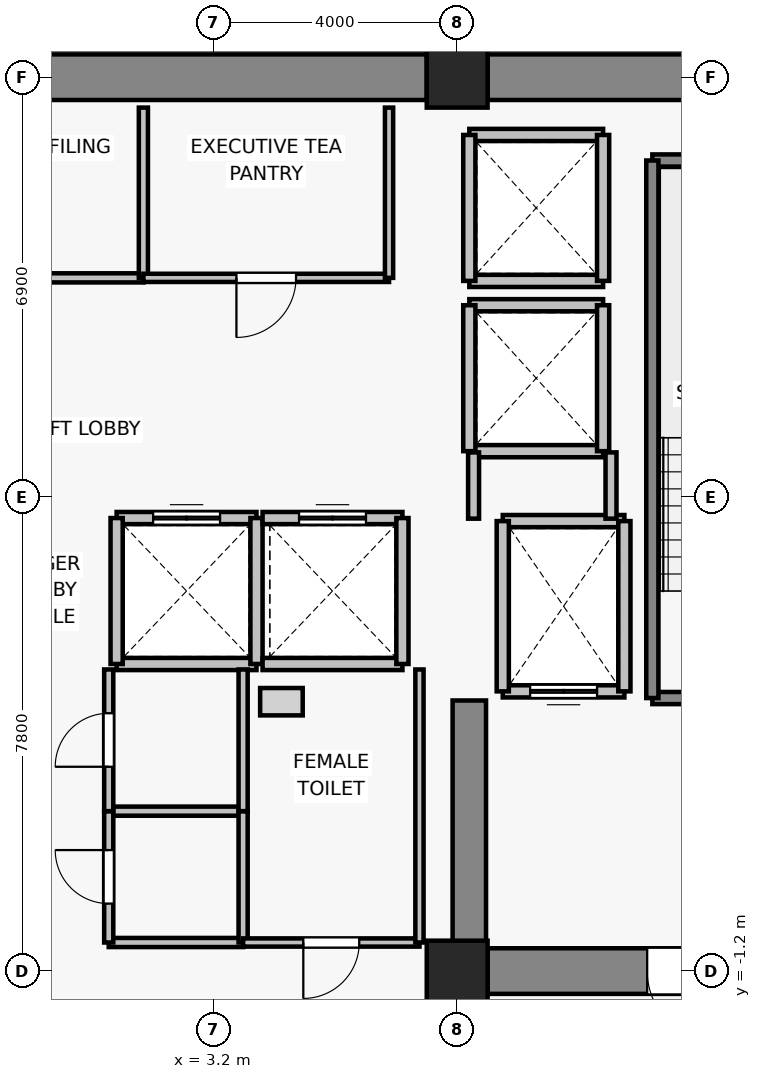
"""IFC4 building model, lengths in metres.
Left out: names, types, materials, properties, quantities, classifications, styles, units other than length and angle.
Written with IfcOpenShell. Run it as: python <this file> out.ifc"""

import sys

from ifc_helpers import new_model, si_unit, direction, frame, frame_2d, origin, origin_2d, place, context, subcontext, project, spatial, rectangle, extrude, source, transform, mapped, element, fill, save


model = new_model("IFC4")
c1 = context("Model", 3, precision=1e-05, world=origin(), true_north=direction((0.0, 1.0)))
c2 = subcontext(c1, "Body", "Model", "MODEL_VIEW")
j1 = project(units=[si_unit("LENGTHUNIT", "METRE"), si_unit("PLANEANGLEUNIT", "RADIAN")], contexts=[c1])
p1 = place(None, origin())
s1 = spatial("IfcSite", under=j1, at=p1, CompositionType="ELEMENT")
p2 = place(p1, origin())
s2 = spatial("IfcBuilding", under=s1, at=p2, CompositionType="ELEMENT")
p3 = place(p2, frame((0.0, 0.0, 192.4)))
s3 = spatial("IfcBuildingStorey", under=s2, at=p3, CompositionType="ELEMENT", Elevation=192.4)
for number, where, z_axis, x_axis in (
    (1, (7.2, -1.2, 0.0), (0.0, 0.0, 1.0), (1.0, 0.0, 0.0)),
    (2, (7.2, 13.5, 0.0), (0.0, 0.0, 1.0), (1.0, 0.0, 0.0)),
):
    element("IfcColumn", number, at=place(p3, frame(where, z_axis=z_axis, x_axis=x_axis)), inside=s3, PredefinedType="COLUMN", context=c2, shape_type="SweptSolid", body=[
        extrude(rectangle(XDim=1.0, YDim=1.0, at=origin_2d()), origin(), (0.0, 0.0, 1.0), 3.3),
    ])
p4 = place(p3, frame((-6.7, 13.5, 0.0), z_axis=(0.0, 0.0, 1.0), x_axis=(1.0, 0.0, 0.0)))
e3 = element("IfcWall", 3, at=p4, inside=s3, PredefinedType="SHEAR", context=c2, shape_type="SweptSolid", body=[
    extrude(rectangle(XDim=13.4, YDim=0.75, at=frame_2d((6.7, 0.0))), origin(), (0.0, 0.0, 1.0), 3.075),
])
p5 = place(p3, frame((7.7, 13.5, 0.0), z_axis=(0.0, 0.0, 1.0), x_axis=(1.0, 0.0, 0.0)))
e4 = element("IfcWall", 4, at=p5, inside=s3, PredefinedType="SHEAR", context=c2, shape_type="SweptSolid", body=[
    extrude(rectangle(XDim=6.2, YDim=0.75, at=frame_2d((3.1, 0.0))), origin(), (0.0, 0.0, 1.0), 3.075),
])
p6 = place(p3, frame((13.9, -1.2, 0.0), z_axis=(0.0, 0.0, 1.0), x_axis=(-1.0, 0.0, 0.0)))
e5 = element("IfcWall", 5, at=p6, inside=s3, PredefinedType="SHEAR", context=c2, shape_type="SweptSolid", body=[
    extrude(rectangle(XDim=6.2, YDim=0.75, at=frame_2d((3.1, 0.0))), origin(), (0.0, 0.0, 1.0), 3.075),
])
p7 = place(p6, frame((2.425, 0.0, 0.0)))
e6 = element("IfcOpeningElement", 6, at=p7, cuts=e5, PredefinedType="OPENING", context=c2, shape_type="SweptSolid", body=[
    extrude(rectangle(XDim=1.15, YDim=2.15, at=frame_2d((0.575, 1.075))), frame((0.0, 0.385, 0.0), z_axis=(0.0, -1.0, 0.0), x_axis=(1.0, 0.0, 0.0)), (0.0, 0.0, 1.0), 0.77),
])
p8 = place(p3, frame((7.4, -0.825, 0.0), z_axis=(0.0, 0.0, 1.0), x_axis=(0.0, 1.0, 0.0)))
e7 = element("IfcWall", 7, at=p8, inside=s3, PredefinedType="SHEAR", context=c2, shape_type="SweptSolid", body=[
    extrude(rectangle(XDim=4.075, YDim=0.55, at=frame_2d((2.038, 0.0))), origin(), (0.0, 0.0, 1.0), 3.075),
])
p9 = place(p3, frame((9.95, 3.4, 0.0), z_axis=(0.0, 0.0, 1.0), x_axis=(-1.0, 0.0, 0.0)))
e8 = element("IfcWall", 8, at=p9, inside=s3, PredefinedType="SOLIDWALL", context=c2, shape_type="SweptSolid", body=[
    extrude(rectangle(XDim=2.0, YDim=0.2, at=frame_2d((1.0, 0.0))), origin(), (0.0, 0.0, 1.0), 3.075),
])
p10 = place(p9, frame((0.45, 0.0, 0.0)))
e9 = element("IfcOpeningElement", 9, at=p10, cuts=e8, PredefinedType="OPENING", context=c2, shape_type="SweptSolid", body=[
    extrude(rectangle(XDim=1.1, YDim=2.2, at=frame_2d((0.55, 1.1))), frame((0.0, 0.11, 0.0), z_axis=(0.0, -1.0, 0.0), x_axis=(1.0, 0.0, 0.0)), (0.0, 0.0, 1.0), 0.22),
])
p11 = place(p3, frame((7.95, 6.2, 0.0), z_axis=(0.0, 0.0, 1.0), x_axis=(1.0, 0.0, 0.0)))
e10 = element("IfcWall", 10, at=p11, inside=s3, PredefinedType="SOLIDWALL", context=c2, shape_type="SweptSolid", body=[
    extrude(rectangle(XDim=2.0, YDim=0.2, at=frame_2d((1.0, 0.0))), origin(), (0.0, 0.0, 1.0), 3.075),
])
for number, where, z_axis, x_axis in (
    (11, (7.95, 3.4, 0.0), (0.0, 0.0, 1.0), (0.0, 1.0, 0.0)),
    (12, (9.95, 6.2, 0.0), (0.0, 0.0, 1.0), (0.0, -1.0, 0.0)),
):
    element("IfcWall", number, at=place(p3, frame(where, z_axis=z_axis, x_axis=x_axis)), inside=s3, PredefinedType="SOLIDWALL", context=c2, shape_type="SweptSolid", body=[
        extrude(rectangle(XDim=2.8, YDim=0.2, at=frame_2d((1.4, 0.0))), origin(), (0.0, 0.0, 1.0), 3.075),
    ])
p12 = place(p3, frame((3.9, 3.85, 0.0), z_axis=(0.0, 0.0, 1.0), x_axis=(-1.0, 0.0, 0.0)))
e13 = element("IfcWall", 13, at=p12, inside=s3, PredefinedType="SOLIDWALL", context=c2, shape_type="SweptSolid", body=[
    extrude(rectangle(XDim=2.3, YDim=0.2, at=frame_2d((1.15, 0.0))), origin(), (0.0, 0.0, 1.0), 3.075),
])
p13 = place(p3, frame((1.6, 6.25, 0.0), z_axis=(0.0, 0.0, 1.0), x_axis=(1.0, 0.0, 0.0)))
e14 = element("IfcWall", 14, at=p13, inside=s3, PredefinedType="SOLIDWALL", context=c2, shape_type="SweptSolid", body=[
    extrude(rectangle(XDim=2.3, YDim=0.2, at=frame_2d((1.15, 0.0))), origin(), (0.0, 0.0, 1.0), 3.075),
])
p14 = place(p13, frame((0.6, 0.0, 0.0)))
e15 = element("IfcOpeningElement", 15, at=p14, cuts=e14, PredefinedType="OPENING", context=c2, shape_type="SweptSolid", body=[
    extrude(rectangle(XDim=1.1, YDim=2.2, at=frame_2d((0.55, 1.1))), frame((0.0, 0.11, 0.0), z_axis=(0.0, -1.0, 0.0), x_axis=(1.0, 0.0, 0.0)), (0.0, 0.0, 1.0), 0.22),
])
for number, where, z_axis, x_axis in (
    (16, (1.6, 3.85, 0.0), (0.0, 0.0, 1.0), (0.0, 1.0, 0.0)),
    (17, (3.9, 6.25, 0.0), (0.0, 0.0, 1.0), (0.0, -1.0, 0.0)),
):
    element("IfcWall", number, at=place(p3, frame(where, z_axis=z_axis, x_axis=x_axis)), inside=s3, PredefinedType="SOLIDWALL", context=c2, shape_type="SweptSolid", body=[
        extrude(rectangle(XDim=2.4, YDim=0.2, at=frame_2d((1.2, 0.0))), origin(), (0.0, 0.0, 1.0), 3.075),
    ])
p15 = place(p3, frame((6.3, 3.85, 0.0), z_axis=(0.0, 0.0, 1.0), x_axis=(-1.0, 0.0, 0.0)))
e18 = element("IfcWall", 18, at=p15, inside=s3, PredefinedType="SOLIDWALL", context=c2, shape_type="SweptSolid", body=[
    extrude(rectangle(XDim=2.3, YDim=0.2, at=frame_2d((1.15, 0.0))), origin(), (0.0, 0.0, 1.0), 3.075),
])
p16 = place(p3, frame((4.0, 6.25, 0.0), z_axis=(0.0, 0.0, 1.0), x_axis=(1.0, 0.0, 0.0)))
e19 = element("IfcWall", 19, at=p16, inside=s3, PredefinedType="SOLIDWALL", context=c2, shape_type="SweptSolid", body=[
    extrude(rectangle(XDim=2.3, YDim=0.2, at=frame_2d((1.15, 0.0))), origin(), (0.0, 0.0, 1.0), 3.075),
])
p17 = place(p16, frame((0.6, 0.0, 0.0)))
e20 = element("IfcOpeningElement", 20, at=p17, cuts=e19, PredefinedType="OPENING", context=c2, shape_type="SweptSolid", body=[
    extrude(rectangle(XDim=1.1, YDim=2.2, at=frame_2d((0.55, 1.1))), frame((0.0, 0.11, 0.0), z_axis=(0.0, -1.0, 0.0), x_axis=(1.0, 0.0, 0.0)), (0.0, 0.0, 1.0), 0.22),
])
p18 = place(p3, frame((6.3, 6.25, 0.0), z_axis=(0.0, 0.0, 1.0), x_axis=(0.0, -1.0, 0.0)))
e21 = element("IfcWall", 21, at=p18, inside=s3, PredefinedType="SOLIDWALL", context=c2, shape_type="SweptSolid", body=[
    extrude(rectangle(XDim=2.4, YDim=0.2, at=frame_2d((1.2, 0.0))), origin(), (0.0, 0.0, 1.0), 3.075),
])
for number, where, z_axis, x_axis in (
    (22, (9.6, 7.35, 0.0), (0.0, 0.0, 1.0), (-1.0, 0.0, 0.0)),
    (23, (7.4, 9.75, 0.0), (0.0, 0.0, 1.0), (1.0, 0.0, 0.0)),
):
    element("IfcWall", number, at=place(p3, frame(where, z_axis=z_axis, x_axis=x_axis)), inside=s3, PredefinedType="SOLIDWALL", context=c2, shape_type="SweptSolid", body=[
        extrude(rectangle(XDim=2.2, YDim=0.2, at=frame_2d((1.1, 0.0))), origin(), (0.0, 0.0, 1.0), 2.565),
    ])
p19 = place(p3, frame((7.4, 7.35, 0.0), z_axis=(0.0, 0.0, 1.0), x_axis=(0.0, 1.0, 0.0)))
e24 = element("IfcWall", 24, at=p19, inside=s3, PredefinedType="SOLIDWALL", context=c2, shape_type="SweptSolid", body=[
    extrude(rectangle(XDim=2.4, YDim=0.2, at=frame_2d((1.2, 0.0))), origin(), (0.0, 0.0, 1.0), 2.565),
])
p20 = place(p3, frame((9.6, 9.75, 0.0), z_axis=(0.0, 0.0, 1.0), x_axis=(0.0, -1.0, 0.0)))
e25 = element("IfcWall", 25, at=p20, inside=s3, PredefinedType="SOLIDWALL", context=c2, shape_type="SweptSolid", body=[
    extrude(rectangle(XDim=2.4, YDim=0.2, at=frame_2d((1.2, 0.0))), origin(), (0.0, 0.0, 1.0), 3.075),
])
for number, where, z_axis, x_axis in (
    (26, (9.6, 10.15, 0.0), (0.0, 0.0, 1.0), (-1.0, 0.0, 0.0)),
    (27, (7.4, 12.55, 0.0), (0.0, 0.0, 1.0), (1.0, 0.0, 0.0)),
):
    element("IfcWall", number, at=place(p3, frame(where, z_axis=z_axis, x_axis=x_axis)), inside=s3, PredefinedType="SOLIDWALL", context=c2, shape_type="SweptSolid", body=[
        extrude(rectangle(XDim=2.2, YDim=0.2, at=frame_2d((1.1, 0.0))), origin(), (0.0, 0.0, 1.0), 2.565),
    ])
p21 = place(p3, frame((7.4, 10.15, 0.0), z_axis=(0.0, 0.0, 1.0), x_axis=(0.0, 1.0, 0.0)))
e28 = element("IfcWall", 28, at=p21, inside=s3, PredefinedType="SOLIDWALL", context=c2, shape_type="SweptSolid", body=[
    extrude(rectangle(XDim=2.4, YDim=0.2, at=frame_2d((1.2, 0.0))), origin(), (0.0, 0.0, 1.0), 2.565),
])
p22 = place(p3, frame((9.6, 12.55, 0.0), z_axis=(0.0, 0.0, 1.0), x_axis=(0.0, -1.0, 0.0)))
e29 = element("IfcWall", 29, at=p22, inside=s3, PredefinedType="SOLIDWALL", context=c2, shape_type="SweptSolid", body=[
    extrude(rectangle(XDim=2.4, YDim=0.2, at=frame_2d((1.2, 0.0))), origin(), (0.0, 0.0, 1.0), 3.075),
])
p23 = place(p3, frame((13.93, 3.29, 0.0), z_axis=(0.0, 0.0, 1.0), x_axis=(-1.0, 0.0, 0.0)))
e30 = element("IfcWall", 30, at=p23, inside=s3, PredefinedType="SOLIDWALL", context=c2, shape_type="SweptSolid", body=[
    extrude(rectangle(XDim=3.52, YDim=0.2, at=frame_2d((1.76, 0.0))), origin(), (0.0, 0.0, 1.0), 3.075),
])
p24 = place(p23, frame((1.205, 0.0, 0.0)))
e31 = element("IfcOpeningElement", 31, at=p24, cuts=e30, PredefinedType="OPENING", context=c2, shape_type="SweptSolid", body=[
    extrude(rectangle(XDim=1.15, YDim=2.15, at=frame_2d((0.575, 1.075))), frame((0.0, 0.11, 0.0), z_axis=(0.0, -1.0, 0.0), x_axis=(1.0, 0.0, 0.0)), (0.0, 0.0, 1.0), 0.22),
])
p25 = place(p3, frame((10.41, 12.13, 0.0), z_axis=(0.0, 0.0, 1.0), x_axis=(1.0, 0.0, 0.0)))
e32 = element("IfcWall", 32, at=p25, inside=s3, PredefinedType="SOLIDWALL", context=c2, shape_type="SweptSolid", body=[
    extrude(rectangle(XDim=3.52, YDim=0.2, at=frame_2d((1.76, 0.0))), origin(), (0.0, 0.0, 1.0), 3.075),
])
p26 = place(p3, frame((10.41, 3.29, 0.0), z_axis=(0.0, 0.0, 1.0), x_axis=(0.0, 1.0, 0.0)))
e33 = element("IfcWall", 33, at=p26, inside=s3, PredefinedType="SOLIDWALL", context=c2, shape_type="SweptSolid", body=[
    extrude(rectangle(XDim=8.84, YDim=0.2, at=frame_2d((4.42, 0.0))), origin(), (0.0, 0.0, 1.0), 3.075),
])
p27 = place(p3, frame((7.47, 6.24, 0.0), z_axis=(0.0, 0.0, 1.0), x_axis=(0.0, 1.0, 0.0)))
e34 = element("IfcWall", 34, at=p27, inside=s3, PredefinedType="PARTITIONING", context=c2, shape_type="SweptSolid", body=[
    extrude(rectangle(XDim=1.09, YDim=0.18, at=frame_2d((0.545, 0.0))), origin(), (0.0, 0.0, 1.0), 2.565),
])
p28 = place(p3, frame((9.73, 7.33, 0.0), z_axis=(0.0, 0.0, 1.0), x_axis=(0.0, -1.0, 0.0)))
e35 = element("IfcWall", 35, at=p28, inside=s3, PredefinedType="PARTITIONING", context=c2, shape_type="SweptSolid", body=[
    extrude(rectangle(XDim=1.09, YDim=0.18, at=frame_2d((0.545, 0.0))), origin(), (0.0, 0.0, 1.0), 3.075),
])
p29 = place(p3, frame((2.04, 10.2, 0.0), z_axis=(0.0, 0.0, 1.0), x_axis=(-1.0, 0.0, 0.0)))
e36 = element("IfcWall", 36, at=p29, inside=s3, PredefinedType="PARTITIONING", context=c2, shape_type="SweptSolid", body=[
    extrude(rectangle(XDim=4.16, YDim=0.15, at=frame_2d((2.08, 0.0))), origin(), (0.0, 0.0, 1.0), 3.075),
])
p30 = place(p29, frame((1.55, 0.0, 0.0)))
e37 = element("IfcOpeningElement", 37, at=p30, cuts=e36, PredefinedType="OPENING", context=c2, shape_type="SweptSolid", body=[
    extrude(rectangle(XDim=0.98, YDim=2.15, at=frame_2d((0.49, 1.075))), frame((0.0, 0.085, 0.0), z_axis=(0.0, -1.0, 0.0), x_axis=(1.0, 0.0, 0.0)), (0.0, 0.0, 1.0), 0.17),
])
p31 = place(p3, frame((2.04, 13.0, 0.0), z_axis=(0.0, 0.0, 1.0), x_axis=(0.0, -1.0, 0.0)))
e38 = element("IfcWall", 38, at=p31, inside=s3, PredefinedType="PARTITIONING", context=c2, shape_type="SweptSolid", body=[
    extrude(rectangle(XDim=2.8, YDim=0.15, at=frame_2d((1.4, 0.0))), origin(), (0.0, 0.0, 1.0), 3.075),
])
p32 = place(p3, frame((6.08, 10.2, 0.0), z_axis=(0.0, 0.0, 1.0), x_axis=(-1.0, 0.0, 0.0)))
e39 = element("IfcWall", 39, at=p32, inside=s3, PredefinedType="PARTITIONING", context=c2, shape_type="SweptSolid", body=[
    extrude(rectangle(XDim=4.04, YDim=0.135, at=frame_2d((2.02, 0.0))), origin(), (0.0, 0.0, 1.0), 3.075),
])
p33 = place(p32, frame((1.53, 0.0, 0.0)))
e40 = element("IfcOpeningElement", 40, at=p33, cuts=e39, PredefinedType="OPENING", context=c2, shape_type="SweptSolid", body=[
    extrude(rectangle(XDim=0.98, YDim=2.15, at=frame_2d((0.49, 1.075))), frame((0.0, 0.077, 0.0), z_axis=(0.0, -1.0, 0.0), x_axis=(1.0, 0.0, 0.0)), (0.0, 0.0, 1.0), 0.155),
])
p34 = place(p3, frame((6.08, 13.0, 0.0), z_axis=(0.0, 0.0, 1.0), x_axis=(0.0, -1.0, 0.0)))
e41 = element("IfcWall", 41, at=p34, inside=s3, PredefinedType="PARTITIONING", context=c2, shape_type="SweptSolid", body=[
    extrude(rectangle(XDim=2.8, YDim=0.135, at=frame_2d((1.4, 0.0))), origin(), (0.0, 0.0, 1.0), 3.075),
])
for number, where, z_axis, x_axis in (
    (42, (3.68, -0.73, 0.0), (0.0, 0.0, 1.0), (-1.0, 0.0, 0.0)),
    (43, (1.47, 1.43, 0.0), (0.0, 0.0, 1.0), (1.0, 0.0, 0.0)),
):
    element("IfcWall", number, at=place(p3, frame(where, z_axis=z_axis, x_axis=x_axis)), inside=s3, PredefinedType="PARTITIONING", context=c2, shape_type="SweptSolid", body=[
        extrude(rectangle(XDim=2.21, YDim=0.15, at=frame_2d((1.105, 0.0))), origin(), (0.0, 0.0, 1.0), 3.075),
    ])
p35 = place(p3, frame((1.47, -0.73, 0.0), z_axis=(0.0, 0.0, 1.0), x_axis=(0.0, 1.0, 0.0)))
e44 = element("IfcWall", 44, at=p35, inside=s3, PredefinedType="PARTITIONING", context=c2, shape_type="SweptSolid", body=[
    extrude(rectangle(XDim=2.16, YDim=0.15, at=frame_2d((1.08, 0.0))), origin(), (0.0, 0.0, 1.0), 3.075),
])
p36 = place(p35, frame((0.64, 0.0, 0.0)))
e45 = element("IfcOpeningElement", 45, at=p36, cuts=e44, PredefinedType="OPENING", context=c2, shape_type="SweptSolid", body=[
    extrude(rectangle(XDim=0.88, YDim=2.1, at=frame_2d((0.44, 1.05))), frame((0.0, 0.085, 0.0), z_axis=(0.0, -1.0, 0.0), x_axis=(1.0, 0.0, 0.0)), (0.0, 0.0, 1.0), 0.17),
])
p37 = place(p3, frame((3.68, 1.43, 0.0), z_axis=(0.0, 0.0, 1.0), x_axis=(0.0, -1.0, 0.0)))
e46 = element("IfcWall", 46, at=p37, inside=s3, PredefinedType="PARTITIONING", context=c2, shape_type="SweptSolid", body=[
    extrude(rectangle(XDim=2.16, YDim=0.15, at=frame_2d((1.08, 0.0))), origin(), (0.0, 0.0, 1.0), 3.075),
])
p38 = place(p3, frame((1.47, 1.43, 0.0), z_axis=(0.0, 0.0, 1.0), x_axis=(0.0, 1.0, 0.0)))
e47 = element("IfcWall", 47, at=p38, inside=s3, PredefinedType="PARTITIONING", context=c2, shape_type="SweptSolid", body=[
    extrude(rectangle(XDim=2.33, YDim=0.15, at=frame_2d((1.165, 0.0))), origin(), (0.0, 0.0, 1.0), 3.075),
])
p39 = place(p38, frame((0.73, 0.0, 0.0)))
e48 = element("IfcOpeningElement", 48, at=p39, cuts=e47, PredefinedType="OPENING", context=c2, shape_type="SweptSolid", body=[
    extrude(rectangle(XDim=0.88, YDim=2.15, at=frame_2d((0.44, 1.075))), frame((0.0, 0.085, 0.0), z_axis=(0.0, -1.0, 0.0), x_axis=(1.0, 0.0, 0.0)), (0.0, 0.0, 1.0), 0.17),
])
p40 = place(p3, frame((3.68, 3.76, 0.0), z_axis=(0.0, 0.0, 1.0), x_axis=(0.0, -1.0, 0.0)))
e49 = element("IfcWall", 49, at=p40, inside=s3, PredefinedType="PARTITIONING", context=c2, shape_type="SweptSolid", body=[
    extrude(rectangle(XDim=2.33, YDim=0.15, at=frame_2d((1.165, 0.0))), origin(), (0.0, 0.0, 1.0), 3.075),
])
p41 = place(p3, frame((6.58, -0.73, 0.0), z_axis=(0.0, 0.0, 1.0), x_axis=(-1.0, 0.0, 0.0)))
e50 = element("IfcWall", 50, at=p41, inside=s3, PredefinedType="PARTITIONING", context=c2, shape_type="SweptSolid", body=[
    extrude(rectangle(XDim=2.9, YDim=0.135, at=frame_2d((1.45, 0.0))), origin(), (0.0, 0.0, 1.0), 3.075),
])
p42 = place(p41, frame((0.99, 0.0, 0.0)))
e51 = element("IfcOpeningElement", 51, at=p42, cuts=e50, PredefinedType="OPENING", context=c2, shape_type="SweptSolid", body=[
    extrude(rectangle(XDim=0.92, YDim=2.1, at=frame_2d((0.46, 1.05))), frame((0.0, 0.077, 0.0), z_axis=(0.0, -1.0, 0.0), x_axis=(1.0, 0.0, 0.0)), (0.0, 0.0, 1.0), 0.155),
])
p43 = place(p3, frame((6.58, 3.76, 0.0), z_axis=(0.0, 0.0, 1.0), x_axis=(0.0, -1.0, 0.0)))
e52 = element("IfcWall", 52, at=p43, inside=s3, PredefinedType="PARTITIONING", context=c2, shape_type="SweptSolid", body=[
    extrude(rectangle(XDim=4.49, YDim=0.135, at=frame_2d((2.245, 0.0))), origin(), (0.0, 0.0, 1.0), 3.075),
])
m1 = source(origin(), c2, "Body", "SweptSolid", [
    extrude(rectangle(XDim=1.1, YDim=2.2, at=frame_2d((0.55, 1.1))), frame((0.0, 0.025, 0.0), z_axis=(0.0, -1.0, 0.0), x_axis=(1.0, 0.0, 0.0)), (0.0, 0.0, 1.0), 0.05),
])
p44 = place(p10, origin())
e53 = element("IfcDoor", 53, at=p44, inside=s3, OperationType="DOUBLE_DOOR_SLIDING", PredefinedType="DOOR", context=c2, shape_type="MappedRepresentation", body=[
    mapped(m1, transform((0.0, 0.0, 0.0), x_axis=(1.0, 0.0, 0.0), y_axis=(0.0, 1.0, 0.0), z_axis=(0.0, 0.0, 1.0), scale=1.0)),
])
fill(e9, e53)
p45 = place(p14, origin())
e54 = element("IfcDoor", 54, at=p45, inside=s3, OperationType="DOUBLE_DOOR_SLIDING", PredefinedType="DOOR", context=c2, shape_type="MappedRepresentation", body=[
    mapped(m1, transform((0.0, 0.0, 0.0), x_axis=(1.0, 0.0, 0.0), y_axis=(0.0, 1.0, 0.0), z_axis=(0.0, 0.0, 1.0), scale=1.0)),
])
fill(e15, e54)
p46 = place(p17, origin())
e55 = element("IfcDoor", 55, at=p46, inside=s3, OperationType="DOUBLE_DOOR_SLIDING", PredefinedType="DOOR", context=c2, shape_type="MappedRepresentation", body=[
    mapped(m1, transform((0.0, 0.0, 0.0), x_axis=(1.0, 0.0, 0.0), y_axis=(0.0, 1.0, 0.0), z_axis=(0.0, 0.0, 1.0), scale=1.0)),
])
fill(e20, e55)
m2 = source(origin(), c2, "Body", "SweptSolid", [
    extrude(rectangle(XDim=1.15, YDim=2.15, at=frame_2d((0.575, 1.075))), frame((0.0, 0.025, 0.0), z_axis=(0.0, -1.0, 0.0), x_axis=(1.0, 0.0, 0.0)), (0.0, 0.0, 1.0), 0.05),
])
p47 = place(p7, origin())
e56 = element("IfcDoor", 56, at=p47, inside=s3, OperationType="SINGLE_SWING_LEFT", PredefinedType="DOOR", context=c2, shape_type="MappedRepresentation", body=[
    mapped(m2, transform((0.0, 0.0, 0.0), x_axis=(1.0, 0.0, 0.0), y_axis=(0.0, 1.0, 0.0), z_axis=(0.0, 0.0, 1.0), scale=1.0)),
])
fill(e6, e56)
m3 = source(origin(), c2, "Body", "SweptSolid", [
    extrude(rectangle(XDim=0.98, YDim=2.15, at=frame_2d((0.49, 1.075))), frame((0.0, 0.025, 0.0), z_axis=(0.0, -1.0, 0.0), x_axis=(1.0, 0.0, 0.0)), (0.0, 0.0, 1.0), 0.05),
])
p48 = place(p33, origin())
e57 = element("IfcDoor", 57, at=p48, inside=s3, OperationType="SINGLE_SWING_RIGHT", PredefinedType="DOOR", context=c2, shape_type="MappedRepresentation", body=[
    mapped(m3, transform((0.0, 0.0, 0.0), x_axis=(1.0, 0.0, 0.0), y_axis=(0.0, 1.0, 0.0), z_axis=(0.0, 0.0, 1.0), scale=1.0)),
])
fill(e40, e57)
m4 = source(origin(), c2, "Body", "SweptSolid", [
    extrude(rectangle(XDim=0.88, YDim=2.1, at=frame_2d((0.44, 1.05))), frame((0.0, 0.025, 0.0), z_axis=(0.0, -1.0, 0.0), x_axis=(1.0, 0.0, 0.0)), (0.0, 0.0, 1.0), 0.05),
])
p49 = place(p36, origin())
e58 = element("IfcDoor", 58, at=p49, inside=s3, OperationType="SINGLE_SWING_RIGHT", PredefinedType="DOOR", context=c2, shape_type="MappedRepresentation", body=[
    mapped(m4, transform((0.0, 0.0, 0.0), x_axis=(1.0, 0.0, 0.0), y_axis=(0.0, 1.0, 0.0), z_axis=(0.0, 0.0, 1.0), scale=1.0)),
])
fill(e45, e58)
m5 = source(origin(), c2, "Body", "SweptSolid", [
    extrude(rectangle(XDim=0.88, YDim=2.15, at=frame_2d((0.44, 1.075))), frame((0.0, 0.025, 0.0), z_axis=(0.0, -1.0, 0.0), x_axis=(1.0, 0.0, 0.0)), (0.0, 0.0, 1.0), 0.05),
])
p50 = place(p39, origin())
e59 = element("IfcDoor", 59, at=p50, inside=s3, OperationType="SINGLE_SWING_LEFT", PredefinedType="DOOR", context=c2, shape_type="MappedRepresentation", body=[
    mapped(m5, transform((0.0, 0.0, 0.0), x_axis=(1.0, 0.0, 0.0), y_axis=(0.0, 1.0, 0.0), z_axis=(0.0, 0.0, 1.0), scale=1.0)),
])
fill(e48, e59)
m6 = source(origin(), c2, "Body", "SweptSolid", [
    extrude(rectangle(XDim=0.92, YDim=2.1, at=frame_2d((0.46, 1.05))), frame((0.0, 0.025, 0.0), z_axis=(0.0, -1.0, 0.0), x_axis=(1.0, 0.0, 0.0)), (0.0, 0.0, 1.0), 0.05),
])
p51 = place(p42, origin())
e60 = element("IfcDoor", 60, at=p51, inside=s3, OperationType="SINGLE_SWING_RIGHT", PredefinedType="DOOR", context=c2, shape_type="MappedRepresentation", body=[
    mapped(m6, transform((0.0, 0.0, 0.0), x_axis=(1.0, 0.0, 0.0), y_axis=(0.0, 1.0, 0.0), z_axis=(0.0, 0.0, 1.0), scale=1.0)),
])
fill(e51, e60)
save(model, sys.argv[1])
